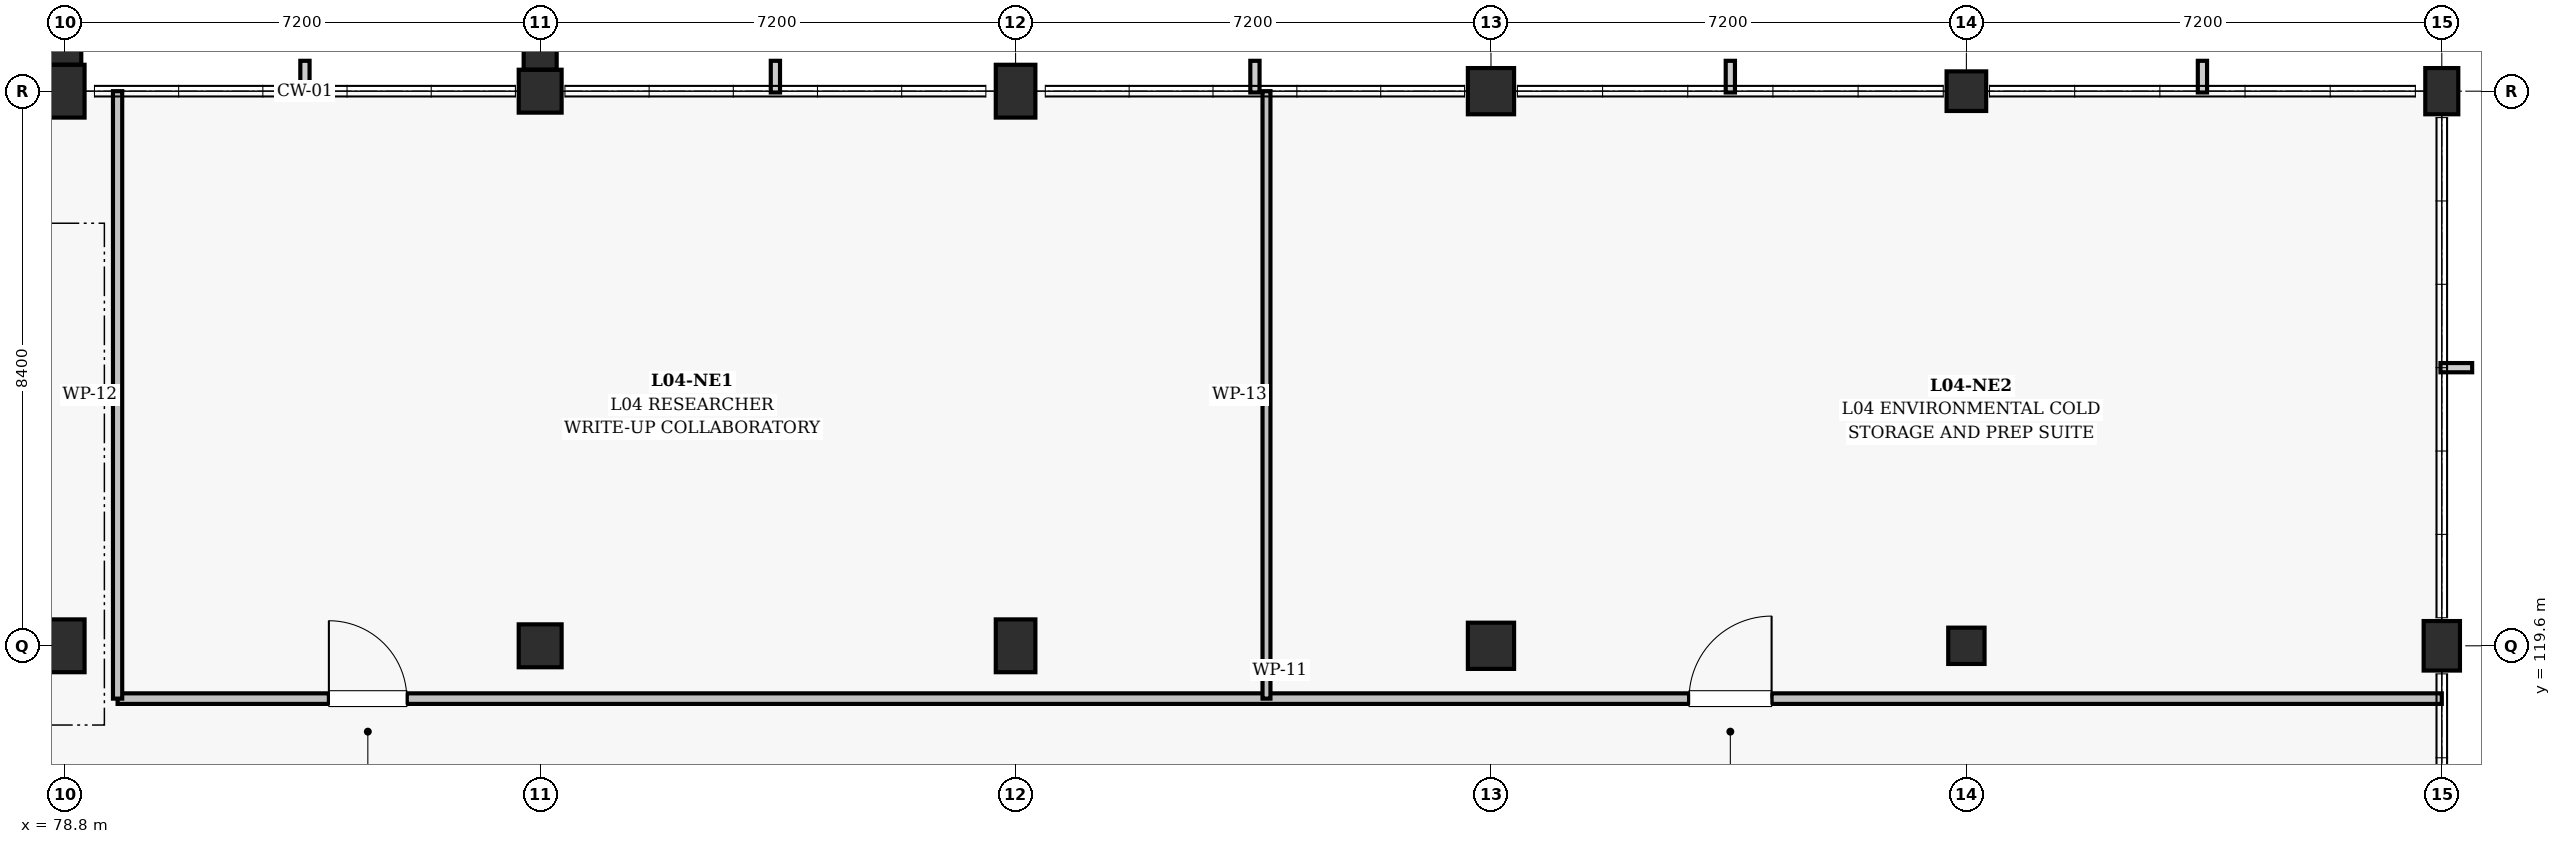
"""IFC4 building model, lengths in metres.
Left out: names, types, materials, properties, quantities, classifications, styles, units other than length and angle.
Written with IfcOpenShell. Run it as: python <this file> out.ifc"""

import sys

from ifc_helpers import new_model, si_unit, direction, frame, frame_2d, origin, origin_2d, place, context, subcontext, project, spatial, rectangle, extrude, element, fill, save


model = new_model("IFC4")
c1 = context("Model", 3, precision=1e-05, world=origin(), true_north=direction((0.0, 1.0)))
c2 = subcontext(c1, "Body", "Model", "MODEL_VIEW")
j1 = project(units=[si_unit("LENGTHUNIT", "METRE"), si_unit("PLANEANGLEUNIT", "RADIAN")], contexts=[c1])
p1 = place(None, origin())
s1 = spatial("IfcSite", under=j1, at=p1, CompositionType="ELEMENT")
p2 = place(p1, origin())
s2 = spatial("IfcBuilding", under=s1, at=p2, CompositionType="ELEMENT")
p3 = place(p2, frame((0.0, 0.0, 18.9)))
s3 = spatial("IfcBuildingStorey", under=s2, at=p3, CompositionType="ELEMENT", Elevation=18.9)
for number, where, z_axis, x_axis in (
    (1, (78.8, 119.6, 0.0), (0.0, 0.0, 1.0), (1.0, 0.0, 0.0)),
    (2, (78.8, 128.0, 0.0), (0.0, 0.0, 1.0), (1.0, 0.0, 0.0)),
):
    element("IfcColumn", number, at=place(p3, frame(where, z_axis=z_axis, x_axis=x_axis)), inside=s3, PredefinedType="COLUMN", context=c2, shape_type="SweptSolid", body=[
        extrude(rectangle(XDim=0.6, YDim=0.8, at=origin_2d()), origin(), (0.0, 0.0, 1.0), 4.5),
    ])
for number, where, z_axis, x_axis in (
    (3, (86.0, 119.6, 0.0), (0.0, 0.0, 1.0), (1.0, 0.0, 0.0)),
    (4, (86.0, 128.0, 0.0), (0.0, 0.0, 1.0), (1.0, 0.0, 0.0)),
):
    element("IfcColumn", number, at=place(p3, frame(where, z_axis=z_axis, x_axis=x_axis)), inside=s3, PredefinedType="COLUMN", context=c2, shape_type="SweptSolid", body=[
        extrude(rectangle(XDim=0.65, YDim=0.65, at=origin_2d()), origin(), (0.0, 0.0, 1.0), 4.5),
    ])
for number, where, z_axis, x_axis in (
    (5, (93.2, 119.6, 0.0), (0.0, 0.0, 1.0), (1.0, 0.0, 0.0)),
    (6, (93.2, 128.0, 0.0), (0.0, 0.0, 1.0), (1.0, 0.0, 0.0)),
):
    element("IfcColumn", number, at=place(p3, frame(where, z_axis=z_axis, x_axis=x_axis)), inside=s3, PredefinedType="COLUMN", context=c2, shape_type="SweptSolid", body=[
        extrude(rectangle(XDim=0.6, YDim=0.8, at=origin_2d()), origin(), (0.0, 0.0, 1.0), 4.5),
    ])
for number, where, z_axis, x_axis in (
    (7, (100.4, 119.6, 0.0), (0.0, 0.0, 1.0), (1.0, 0.0, 0.0)),
    (8, (100.4, 128.0, 0.0), (0.0, 0.0, 1.0), (1.0, 0.0, 0.0)),
):
    element("IfcColumn", number, at=place(p3, frame(where, z_axis=z_axis, x_axis=x_axis)), inside=s3, PredefinedType="COLUMN", context=c2, shape_type="SweptSolid", body=[
        extrude(rectangle(XDim=0.7, YDim=0.7, at=origin_2d()), origin(), (0.0, 0.0, 1.0), 4.5),
    ])
p4 = place(p3, frame((107.6, 119.6, 0.0), z_axis=(0.0, 0.0, 1.0), x_axis=(1.0, 0.0, 0.0)))
e9 = element("IfcColumn", 9, at=p4, inside=s3, PredefinedType="COLUMN", context=c2, shape_type="SweptSolid", body=[
    extrude(rectangle(XDim=0.55, YDim=0.55, at=origin_2d()), origin(), (0.0, 0.0, 1.0), 4.5),
])
p5 = place(p3, frame((107.6, 128.0, 0.0), z_axis=(0.0, 0.0, 1.0), x_axis=(1.0, 0.0, 0.0)))
e10 = element("IfcColumn", 10, at=p5, inside=s3, PredefinedType="COLUMN", context=c2, shape_type="SweptSolid", body=[
    extrude(rectangle(XDim=0.6, YDim=0.6, at=origin_2d()), origin(), (0.0, 0.0, 1.0), 4.5),
])
p6 = place(p3, frame((114.8, 119.6, 0.0), z_axis=(0.0, 0.0, 1.0), x_axis=(1.0, 0.0, 0.0)))
e11 = element("IfcColumn", 11, at=p6, inside=s3, PredefinedType="COLUMN", context=c2, shape_type="SweptSolid", body=[
    extrude(rectangle(XDim=0.55, YDim=0.75, at=origin_2d()), origin(), (0.0, 0.0, 1.0), 4.5),
])
p7 = place(p3, frame((114.8, 128.0, 0.0), z_axis=(0.0, 0.0, 1.0), x_axis=(1.0, 0.0, 0.0)))
e12 = element("IfcColumn", 12, at=p7, inside=s3, PredefinedType="COLUMN", context=c2, shape_type="SweptSolid", body=[
    extrude(rectangle(XDim=0.5, YDim=0.7, at=origin_2d()), origin(), (0.0, 0.0, 1.0), 4.5),
])
for number, where, z_axis, x_axis in (
    (13, (78.8, 128.778, 0.0), (0.0, 0.0, 1.0), (1.0, 0.0, 0.0)),
    (14, (86.0, 128.703, 0.0), (0.0, 0.0, 1.0), (1.0, 0.0, 0.0)),
):
    element("IfcColumn", number, at=place(p3, frame(where, z_axis=z_axis, x_axis=x_axis)), inside=s3, PredefinedType="PILASTER", context=c2, shape_type="SweptSolid", body=[
        extrude(rectangle(XDim=0.5, YDim=0.75, at=origin_2d()), origin(), (0.0, 0.0, 1.0), 4.5),
    ])
p8 = place(p3, frame((79.6, 118.8, 0.0), z_axis=(0.0, 0.0, 1.0), x_axis=(1.0, 0.0, 0.0)))
e15 = element("IfcWall", 15, at=p8, inside=s3, PredefinedType="PARTITIONING", context=c2, shape_type="SweptSolid", body=[
    extrude(rectangle(XDim=35.2, YDim=0.16, at=frame_2d((17.6, 0.0))), origin(), (0.0, 0.0, 1.0), 2.96),
])
p9 = place(p8, frame((3.2, 0.0, 0.0)))
e16 = element("IfcOpeningElement", 16, at=p9, cuts=e15, PredefinedType="OPENING", context=c2, shape_type="SweptSolid", body=[
    extrude(rectangle(XDim=1.18, YDim=2.2, at=frame_2d((0.59, 1.1))), frame((0.0, 0.09, 0.0), z_axis=(0.0, -1.0, 0.0), x_axis=(1.0, 0.0, 0.0)), (0.0, 0.0, 1.0), 0.18),
])
p10 = place(p8, frame((23.8, 0.0, 0.0)))
e17 = element("IfcOpeningElement", 17, at=p10, cuts=e15, PredefinedType="OPENING", context=c2, shape_type="SweptSolid", body=[
    extrude(rectangle(XDim=1.25, YDim=2.2, at=frame_2d((0.625, 1.1))), frame((0.0, 0.09, 0.0), z_axis=(0.0, -1.0, 0.0), x_axis=(1.0, 0.0, 0.0)), (0.0, 0.0, 1.0), 0.18),
])
p11 = place(p3, frame((79.6, 118.8, 0.0), z_axis=(0.0, 0.0, 1.0), x_axis=(0.0, 1.0, 0.0)))
e18 = element("IfcWall", 18, at=p11, inside=s3, PredefinedType="PARTITIONING", context=c2, shape_type="SweptSolid", body=[
    extrude(rectangle(XDim=9.2, YDim=0.14, at=frame_2d((4.6, 0.0))), origin(), (0.0, 0.0, 1.0), 3.51),
])
p12 = place(p3, frame((97.0, 118.8, 0.0), z_axis=(0.0, 0.0, 1.0), x_axis=(0.0, 1.0, 0.0)))
e19 = element("IfcWall", 19, at=p12, inside=s3, PredefinedType="PARTITIONING", context=c2, shape_type="SweptSolid", body=[
    extrude(rectangle(XDim=9.2, YDim=0.12, at=frame_2d((4.6, 0.0))), origin(), (0.0, 0.0, 1.0), 3.36),
])
p13 = place(p9, origin())
e20 = element("IfcDoor", 20, at=p13, inside=s3, OperationType="SINGLE_SWING_LEFT", PredefinedType="DOOR", context=c2, shape_type="SweptSolid", body=[
    extrude(rectangle(XDim=1.18, YDim=2.2, at=frame_2d((0.59, 1.1))), frame((0.0, 0.025, 0.0), z_axis=(0.0, -1.0, 0.0), x_axis=(1.0, 0.0, 0.0)), (0.0, 0.0, 1.0), 0.05),
])
fill(e16, e20)
p14 = place(p10, origin())
e21 = element("IfcDoor", 21, at=p14, inside=s3, OperationType="SINGLE_SWING_RIGHT", PredefinedType="DOOR", context=c2, shape_type="SweptSolid", body=[
    extrude(rectangle(XDim=1.25, YDim=2.2, at=frame_2d((0.625, 1.1))), frame((0.0, 0.025, 0.0), z_axis=(0.0, -1.0, 0.0), x_axis=(1.0, 0.0, 0.0)), (0.0, 0.0, 1.0), 0.05),
])
fill(e17, e21)
save(model, sys.argv[1])
